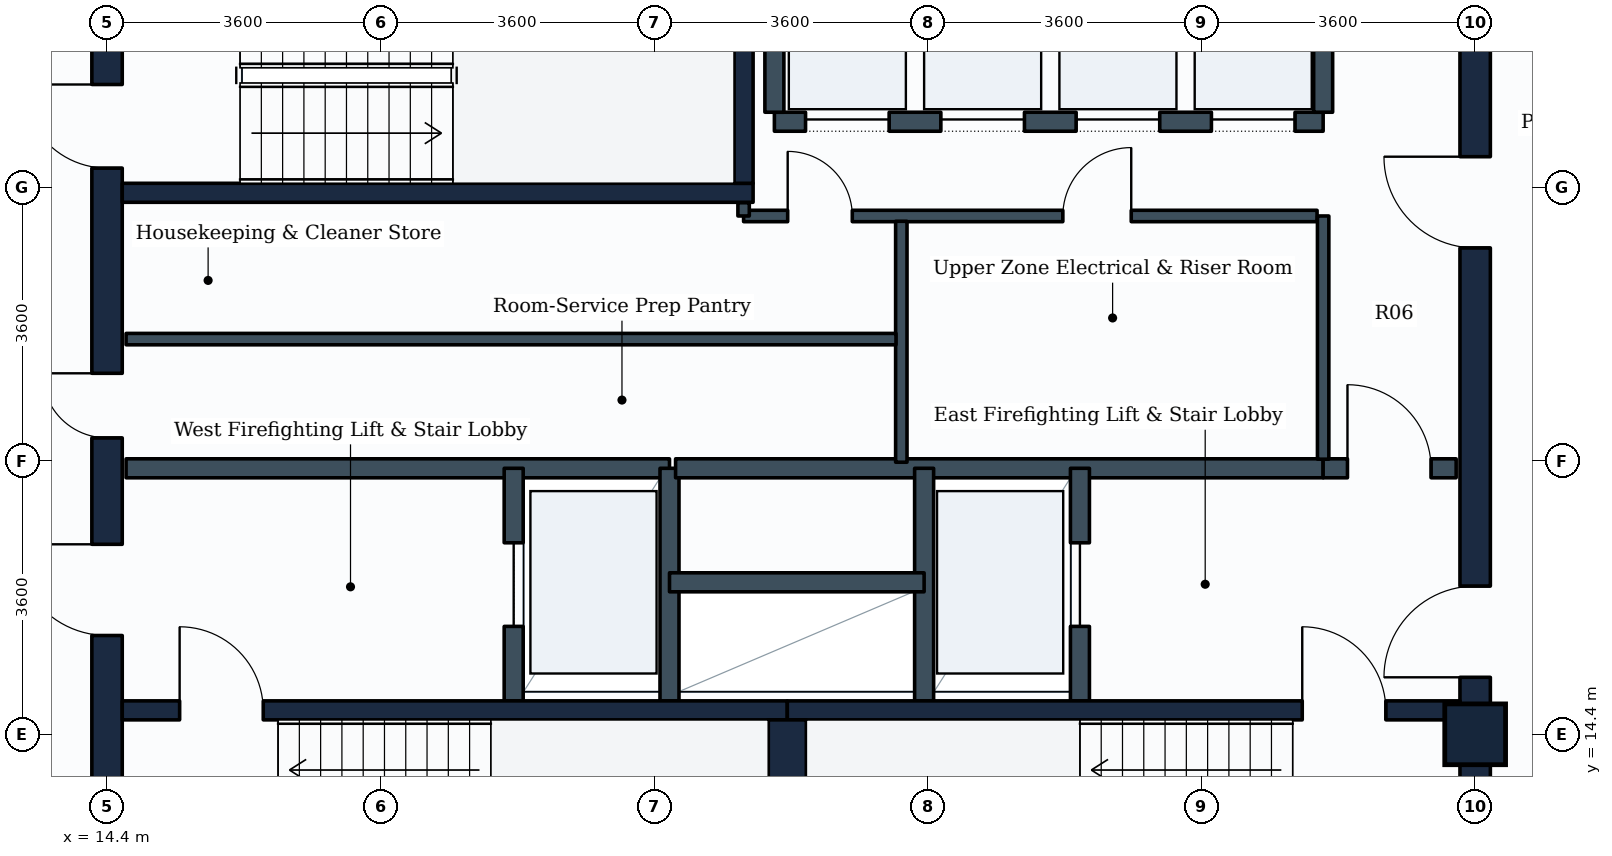
"""IFC4 building model, lengths in metres.
Left out: names, types, materials, properties, quantities, classifications, styles, units other than length and angle.
Written with IfcOpenShell. Run it as: python <this file> out.ifc"""

import sys

from ifc_helpers import new_model, si_unit, direction, frame, frame_2d, origin, origin_2d, place, context, subcontext, project, spatial, rectangle, extrude, element, fill, save


model = new_model("IFC4")
c1 = context("Model", 3, precision=1e-05, world=origin(), true_north=direction((0.0, 1.0)))
c2 = subcontext(c1, "Body", "Model", "MODEL_VIEW")
j1 = project(units=[si_unit("LENGTHUNIT", "METRE"), si_unit("PLANEANGLEUNIT", "RADIAN")], contexts=[c1])
p1 = place(None, origin())
s1 = spatial("IfcSite", under=j1, at=p1, CompositionType="ELEMENT")
p2 = place(p1, origin())
s2 = spatial("IfcBuilding", under=s1, at=p2, CompositionType="ELEMENT")
p3 = place(p2, frame((0.0, 0.0, 291.8)))
s3 = spatial("IfcBuildingStorey", under=s2, at=p3, CompositionType="ELEMENT", Elevation=291.8)
p4 = place(p3, frame((32.4, 14.4, 0.0), z_axis=(0.0, 0.0, 1.0), x_axis=(1.0, 0.0, 0.0)))
e1 = element("IfcColumn", 1, at=p4, inside=s3, PredefinedType="COLUMN", context=c2, shape_type="SweptSolid", body=[
    extrude(rectangle(XDim=0.8, YDim=0.8, at=origin_2d()), origin(), (0.0, 0.0, 1.0), 3.6),
])
p5 = place(p3, frame((14.4, 10.8, 0.0), z_axis=(0.0, 0.0, 1.0), x_axis=(0.0, 1.0, 0.0)))
e2 = element("IfcWall", 2, at=p5, inside=s3, PredefinedType="SHEAR", context=c2, shape_type="SweptSolid", body=[
    extrude(rectangle(XDim=14.4, YDim=0.4, at=frame_2d((7.2, 0.0))), origin(), (0.0, 0.0, 1.0), 3.35),
])
p6 = place(p5, frame((11.05, 0.0, 0.0)))
e3 = element("IfcOpeningElement", 3, at=p6, cuts=e2, PredefinedType="OPENING", context=c2, shape_type="SweptSolid", body=[
    extrude(rectangle(XDim=1.1, YDim=2.1, at=frame_2d((0.55, 1.05))), frame((0.0, 0.21, 0.0), z_axis=(0.0, -1.0, 0.0), x_axis=(1.0, 0.0, 0.0)), (0.0, 0.0, 1.0), 0.42),
])
p7 = place(p5, frame((4.9, 0.0, 0.0)))
e4 = element("IfcOpeningElement", 4, at=p7, cuts=e2, PredefinedType="OPENING", context=c2, shape_type="SweptSolid", body=[
    extrude(rectangle(XDim=1.2, YDim=2.1, at=frame_2d((0.6, 1.05))), frame((0.0, 0.21, 0.0), z_axis=(0.0, -1.0, 0.0), x_axis=(1.0, 0.0, 0.0)), (0.0, 0.0, 1.0), 0.42),
])
p8 = place(p5, frame((7.5, 0.0, 0.0)))
e5 = element("IfcOpeningElement", 5, at=p8, cuts=e2, PredefinedType="OPENING", context=c2, shape_type="SweptSolid", body=[
    extrude(rectangle(XDim=0.85, YDim=2.1, at=frame_2d((0.425, 1.05))), frame((0.0, 0.21, 0.0), z_axis=(0.0, -1.0, 0.0), x_axis=(1.0, 0.0, 0.0)), (0.0, 0.0, 1.0), 0.42),
])
p9 = place(p3, frame((32.4, 10.8, 0.0), z_axis=(0.0, 0.0, 1.0), x_axis=(0.0, 1.0, 0.0)))
e6 = element("IfcWall", 6, at=p9, inside=s3, PredefinedType="SHEAR", context=c2, shape_type="SweptSolid", body=[
    extrude(rectangle(XDim=14.4, YDim=0.4, at=frame_2d((7.2, 0.0))), origin(), (0.0, 0.0, 1.0), 3.35),
])
p10 = place(p9, frame((4.35, 0.0, 0.0)))
e7 = element("IfcOpeningElement", 7, at=p10, cuts=e6, PredefinedType="OPENING", context=c2, shape_type="SweptSolid", body=[
    extrude(rectangle(XDim=1.2, YDim=2.1, at=frame_2d((0.6, 1.05))), frame((0.0, 0.21, 0.0), z_axis=(0.0, -1.0, 0.0), x_axis=(1.0, 0.0, 0.0)), (0.0, 0.0, 1.0), 0.42),
])
p11 = place(p9, frame((10.0, 0.0, 0.0)))
e8 = element("IfcOpeningElement", 8, at=p11, cuts=e6, PredefinedType="OPENING", context=c2, shape_type="SweptSolid", body=[
    extrude(rectangle(XDim=1.2, YDim=2.1, at=frame_2d((0.6, 1.05))), frame((0.0, 0.21, 0.0), z_axis=(0.0, -1.0, 0.0), x_axis=(1.0, 0.0, 0.0)), (0.0, 0.0, 1.0), 0.42),
])
p12 = place(p3, frame((14.6, 14.715, 0.0), z_axis=(0.0, 0.0, 1.0), x_axis=(1.0, 0.0, 0.0)))
e9 = element("IfcWall", 9, at=p12, inside=s3, PredefinedType="SHEAR", context=c2, shape_type="SweptSolid", body=[
    extrude(rectangle(XDim=8.75, YDim=0.25, at=frame_2d((4.375, 0.0))), origin(), (0.0, 0.0, 1.0), 3.35),
])
p13 = place(p12, frame((0.755, 0.0, 0.0)))
e10 = element("IfcOpeningElement", 10, at=p13, cuts=e9, PredefinedType="OPENING", context=c2, shape_type="SweptSolid", body=[
    extrude(rectangle(XDim=1.1, YDim=2.1, at=frame_2d((0.55, 1.05))), frame((0.0, 0.135, 0.0), z_axis=(0.0, -1.0, 0.0), x_axis=(1.0, 0.0, 0.0)), (0.0, 0.0, 1.0), 0.27),
])
p14 = place(p3, frame((23.35, 14.715, 0.0), z_axis=(0.0, 0.0, 1.0), x_axis=(1.0, 0.0, 0.0)))
e11 = element("IfcWall", 11, at=p14, inside=s3, PredefinedType="SHEAR", context=c2, shape_type="SweptSolid", body=[
    extrude(rectangle(XDim=8.85, YDim=0.25, at=frame_2d((4.425, 0.0))), origin(), (0.0, 0.0, 1.0), 3.35),
])
p15 = place(p14, frame((6.775, 0.0, 0.0)))
e12 = element("IfcOpeningElement", 12, at=p15, cuts=e11, PredefinedType="OPENING", context=c2, shape_type="SweptSolid", body=[
    extrude(rectangle(XDim=1.1, YDim=2.1, at=frame_2d((0.55, 1.05))), frame((0.0, 0.135, 0.0), z_axis=(0.0, -1.0, 0.0), x_axis=(1.0, 0.0, 0.0)), (0.0, 0.0, 1.0), 0.27),
])
p16 = place(p3, frame((23.35, 11.75, 0.0), z_axis=(0.0, 0.0, 1.0), x_axis=(0.0, 1.0, 0.0)))
e13 = element("IfcWall", 13, at=p16, inside=s3, PredefinedType="SHEAR", context=c2, shape_type="SweptSolid", body=[
    extrude(rectangle(XDim=2.84, YDim=0.5, at=frame_2d((1.42, 0.0))), origin(), (0.0, 0.0, 1.0), 3.35),
])
p17 = place(p3, frame((14.6, 21.525, 0.0), z_axis=(0.0, 0.0, 1.0), x_axis=(1.0, 0.0, 0.0)))
e14 = element("IfcWall", 14, at=p17, inside=s3, PredefinedType="SHEAR", context=c2, shape_type="SweptSolid", body=[
    extrude(rectangle(XDim=8.3, YDim=0.25, at=frame_2d((4.15, 0.0))), origin(), (0.0, 0.0, 1.0), 3.35),
])
p18 = place(p3, frame((22.775, 21.65, 0.0), z_axis=(0.0, 0.0, 1.0), x_axis=(0.0, 1.0, 0.0)))
e15 = element("IfcWall", 15, at=p18, inside=s3, PredefinedType="SHEAR", context=c2, shape_type="SweptSolid", body=[
    extrude(rectangle(XDim=2.84, YDim=0.25, at=frame_2d((1.42, 0.0))), origin(), (0.0, 0.0, 1.0), 3.35),
])
p19 = place(p3, frame((14.65, 17.9, 0.0), z_axis=(0.0, 0.0, 1.0), x_axis=(1.0, 0.0, 0.0)))
e16 = element("IfcWall", 16, at=p19, inside=s3, PredefinedType="PARTITIONING", context=c2, shape_type="SweptSolid", body=[
    extrude(rectangle(XDim=7.15, YDim=0.25, at=frame_2d((3.575, 0.0))), origin(), (0.0, 0.0, 1.0), 3.335),
])
p20 = place(p3, frame((19.75, 14.84, 0.0), z_axis=(0.0, 0.0, 1.0), x_axis=(0.0, 1.0, 0.0)))
e17 = element("IfcWall", 17, at=p20, inside=s3, PredefinedType="PARTITIONING", context=c2, shape_type="SweptSolid", body=[
    extrude(rectangle(XDim=3.06, YDim=0.25, at=frame_2d((1.53, 0.0))), origin(), (0.0, 0.0, 1.0), 3.335),
])
p21 = place(p20, frame((0.98, 0.0, 0.0)))
e18 = element("IfcOpeningElement", 18, at=p21, cuts=e17, PredefinedType="OPENING", context=c2, shape_type="SweptSolid", body=[
    extrude(rectangle(XDim=1.1, YDim=2.1, at=frame_2d((0.55, 1.05))), frame((0.0, 0.135, 0.0), z_axis=(0.0, -1.0, 0.0), x_axis=(1.0, 0.0, 0.0)), (0.0, 0.0, 1.0), 0.27),
])
p22 = place(p3, frame((21.8, 14.84, 0.0), z_axis=(0.0, 0.0, 1.0), x_axis=(0.0, 1.0, 0.0)))
e19 = element("IfcWall", 19, at=p22, inside=s3, PredefinedType="PARTITIONING", context=c2, shape_type="SweptSolid", body=[
    extrude(rectangle(XDim=3.06, YDim=0.25, at=frame_2d((1.53, 0.0))), origin(), (0.0, 0.0, 1.0), 3.335),
])
p23 = place(p3, frame((21.88, 17.9, 0.0), z_axis=(0.0, 0.0, 1.0), x_axis=(1.0, 0.0, 0.0)))
e20 = element("IfcWall", 20, at=p23, inside=s3, PredefinedType="PARTITIONING", context=c2, shape_type="SweptSolid", body=[
    extrude(rectangle(XDim=8.52, YDim=0.25, at=frame_2d((4.26, 0.0))), origin(), (0.0, 0.0, 1.0), 3.335),
])
p24 = place(p3, frame((30.4, 17.9, 0.0), z_axis=(0.0, 0.0, 1.0), x_axis=(1.0, 0.0, 0.0)))
e21 = element("IfcWall", 21, at=p24, inside=s3, PredefinedType="PARTITIONING", context=c2, shape_type="SweptSolid", body=[
    extrude(rectangle(XDim=1.75, YDim=0.25, at=frame_2d((0.875, 0.0))), origin(), (0.0, 0.0, 1.0), 3.335),
])
p25 = place(p24, frame((0.32, 0.0, 0.0)))
e22 = element("IfcOpeningElement", 22, at=p25, cuts=e21, PredefinedType="OPENING", context=c2, shape_type="SweptSolid", body=[
    extrude(rectangle(XDim=1.1, YDim=2.1, at=frame_2d((0.55, 1.05))), frame((0.0, 0.135, 0.0), z_axis=(0.0, -1.0, 0.0), x_axis=(1.0, 0.0, 0.0)), (0.0, 0.0, 1.0), 0.27),
])
p26 = place(p3, frame((25.15, 14.84, 0.0), z_axis=(0.0, 0.0, 1.0), x_axis=(0.0, 1.0, 0.0)))
e23 = element("IfcWall", 23, at=p26, inside=s3, PredefinedType="PARTITIONING", context=c2, shape_type="SweptSolid", body=[
    extrude(rectangle(XDim=3.06, YDim=0.25, at=frame_2d((1.53, 0.0))), origin(), (0.0, 0.0, 1.0), 3.335),
])
p27 = place(p3, frame((27.2, 14.84, 0.0), z_axis=(0.0, 0.0, 1.0), x_axis=(0.0, 1.0, 0.0)))
e24 = element("IfcWall", 24, at=p27, inside=s3, PredefinedType="PARTITIONING", context=c2, shape_type="SweptSolid", body=[
    extrude(rectangle(XDim=3.06, YDim=0.25, at=frame_2d((1.53, 0.0))), origin(), (0.0, 0.0, 1.0), 3.335),
])
p28 = place(p27, frame((0.98, 0.0, 0.0)))
e25 = element("IfcOpeningElement", 25, at=p28, cuts=e24, PredefinedType="OPENING", context=c2, shape_type="SweptSolid", body=[
    extrude(rectangle(XDim=1.1, YDim=2.1, at=frame_2d((0.55, 1.05))), frame((0.0, 0.135, 0.0), z_axis=(0.0, -1.0, 0.0), x_axis=(1.0, 0.0, 0.0)), (0.0, 0.0, 1.0), 0.27),
])
p29 = place(p3, frame((21.8, 16.4, 0.0), z_axis=(0.0, 0.0, 1.0), x_axis=(1.0, 0.0, 0.0)))
e26 = element("IfcWall", 26, at=p29, inside=s3, PredefinedType="PARTITIONING", context=c2, shape_type="SweptSolid", body=[
    extrude(rectangle(XDim=3.35, YDim=0.25, at=frame_2d((1.675, 0.0))), origin(), (0.0, 0.0, 1.0), 3.335),
])
p30 = place(p3, frame((23.18, 22.46, 0.0), z_axis=(0.0, 0.0, 1.0), x_axis=(1.0, 0.0, 0.0)))
e27 = element("IfcWall", 27, at=p30, inside=s3, PredefinedType="PARTITIONING", context=c2, shape_type="SweptSolid", body=[
    extrude(rectangle(XDim=7.22, YDim=0.25, at=frame_2d((3.61, 0.0))), origin(), (0.0, 0.0, 1.0), 3.335),
])
p31 = place(p30, frame((0.41, 0.0, 0.0)))
e28 = element("IfcOpeningElement", 28, at=p31, cuts=e27, PredefinedType="OPENING", context=c2, shape_type="SweptSolid", body=[
    extrude(rectangle(XDim=1.1, YDim=2.1, at=frame_2d((0.55, 1.05))), frame((0.0, 0.135, 0.0), z_axis=(0.0, -1.0, 0.0), x_axis=(1.0, 0.0, 0.0)), (0.0, 0.0, 1.0), 0.27),
])
p32 = place(p30, frame((2.19, 0.0, 0.0)))
e29 = element("IfcOpeningElement", 29, at=p32, cuts=e27, PredefinedType="OPENING", context=c2, shape_type="SweptSolid", body=[
    extrude(rectangle(XDim=1.1, YDim=2.1, at=frame_2d((0.55, 1.05))), frame((0.0, 0.135, 0.0), z_axis=(0.0, -1.0, 0.0), x_axis=(1.0, 0.0, 0.0)), (0.0, 0.0, 1.0), 0.27),
])
p33 = place(p30, frame((3.97, 0.0, 0.0)))
e30 = element("IfcOpeningElement", 30, at=p33, cuts=e27, PredefinedType="OPENING", context=c2, shape_type="SweptSolid", body=[
    extrude(rectangle(XDim=1.1, YDim=2.1, at=frame_2d((0.55, 1.05))), frame((0.0, 0.135, 0.0), z_axis=(0.0, -1.0, 0.0), x_axis=(1.0, 0.0, 0.0)), (0.0, 0.0, 1.0), 0.27),
])
p34 = place(p30, frame((5.75, 0.0, 0.0)))
e31 = element("IfcOpeningElement", 31, at=p34, cuts=e27, PredefinedType="OPENING", context=c2, shape_type="SweptSolid", body=[
    extrude(rectangle(XDim=1.1, YDim=2.1, at=frame_2d((0.55, 1.05))), frame((0.0, 0.135, 0.0), z_axis=(0.0, -1.0, 0.0), x_axis=(1.0, 0.0, 0.0)), (0.0, 0.0, 1.0), 0.27),
])
for number, where, z_axis, x_axis in (
    (32, (23.18, 22.585, 0.0), (0.0, 0.0, 1.0), (0.0, 1.0, 0.0)),
    (33, (30.4, 22.585, 0.0), (0.0, 0.0, 1.0), (0.0, 1.0, 0.0)),
):
    element("IfcWall", number, at=place(p3, frame(where, z_axis=z_axis, x_axis=x_axis)), inside=s3, PredefinedType="PARTITIONING", context=c2, shape_type="SweptSolid", body=[
        extrude(rectangle(XDim=2.315, YDim=0.25, at=frame_2d((1.157, 0.0))), origin(), (0.0, 0.0, 1.0), 3.335),
    ])
p35 = place(p3, frame((22.775, 21.22, 0.0), z_axis=(0.0, 0.0, 1.0), x_axis=(1.0, 0.0, 0.0)))
e34 = element("IfcWall", 34, at=p35, inside=s3, PredefinedType="PARTITIONING", context=c2, shape_type="SweptSolid", body=[
    extrude(rectangle(XDim=7.545, YDim=0.15, at=frame_2d((3.772, 0.0))), origin(), (0.0, 0.0, 1.0), 3.335),
])
p36 = place(p35, frame((0.58, 0.0, 0.0)))
e35 = element("IfcOpeningElement", 35, at=p36, cuts=e34, PredefinedType="OPENING", context=c2, shape_type="SweptSolid", body=[
    extrude(rectangle(XDim=0.85, YDim=2.1, at=frame_2d((0.425, 1.05))), frame((0.0, 0.085, 0.0), z_axis=(0.0, -1.0, 0.0), x_axis=(1.0, 0.0, 0.0)), (0.0, 0.0, 1.0), 0.17),
])
p37 = place(p35, frame((4.2, 0.0, 0.0)))
e36 = element("IfcOpeningElement", 36, at=p37, cuts=e34, PredefinedType="OPENING", context=c2, shape_type="SweptSolid", body=[
    extrude(rectangle(XDim=0.9, YDim=2.1, at=frame_2d((0.45, 1.05))), frame((0.0, 0.085, 0.0), z_axis=(0.0, -1.0, 0.0), x_axis=(1.0, 0.0, 0.0)), (0.0, 0.0, 1.0), 0.17),
])
p38 = place(p3, frame((22.775, 21.22, 0.0), z_axis=(0.0, 0.0, 1.0), x_axis=(0.0, 1.0, 0.0)))
e37 = element("IfcWall", 37, at=p38, inside=s3, PredefinedType="PARTITIONING", context=c2, shape_type="SweptSolid", body=[
    extrude(rectangle(XDim=0.175, YDim=0.15, at=frame_2d((0.087, 0.0))), origin(), (0.0, 0.0, 1.0), 3.335),
])
p39 = place(p3, frame((30.4, 18.02, 0.0), z_axis=(0.0, 0.0, 1.0), x_axis=(0.0, 1.0, 0.0)))
e38 = element("IfcWall", 38, at=p39, inside=s3, PredefinedType="PARTITIONING", context=c2, shape_type="SweptSolid", body=[
    extrude(rectangle(XDim=3.2, YDim=0.15, at=frame_2d((1.6, 0.0))), origin(), (0.0, 0.0, 1.0), 3.335),
])
p40 = place(p3, frame((24.85, 17.98, 0.0), z_axis=(0.0, 0.0, 1.0), x_axis=(0.0, 1.0, 0.0)))
e39 = element("IfcWall", 39, at=p40, inside=s3, PredefinedType="PARTITIONING", context=c2, shape_type="SweptSolid", body=[
    extrude(rectangle(XDim=3.17, YDim=0.15, at=frame_2d((1.585, 0.0))), origin(), (0.0, 0.0, 1.0), 3.335),
])
p41 = place(p3, frame((14.65, 19.6, 0.0), z_axis=(0.0, 0.0, 1.0), x_axis=(1.0, 0.0, 0.0)))
e40 = element("IfcWall", 40, at=p41, inside=s3, PredefinedType="PARTITIONING", context=c2, shape_type="SweptSolid", body=[
    extrude(rectangle(XDim=10.13, YDim=0.15, at=frame_2d((5.065, 0.0))), origin(), (0.0, 0.0, 1.0), 3.335),
])
p42 = place(p13, origin())
e41 = element("IfcDoor", 41, at=p42, inside=s3, OperationType="SINGLE_SWING_LEFT", PredefinedType="DOOR", context=c2, shape_type="SweptSolid", body=[
    extrude(rectangle(XDim=1.1, YDim=2.1, at=frame_2d((0.55, 1.05))), frame((0.0, 0.025, 0.0), z_axis=(0.0, -1.0, 0.0), x_axis=(1.0, 0.0, 0.0)), (0.0, 0.0, 1.0), 0.05),
])
fill(e10, e41)
p43 = place(p15, origin())
e42 = element("IfcDoor", 42, at=p43, inside=s3, OperationType="SINGLE_SWING_LEFT", PredefinedType="DOOR", context=c2, shape_type="SweptSolid", body=[
    extrude(rectangle(XDim=1.1, YDim=2.1, at=frame_2d((0.55, 1.05))), frame((0.0, 0.025, 0.0), z_axis=(0.0, -1.0, 0.0), x_axis=(1.0, 0.0, 0.0)), (0.0, 0.0, 1.0), 0.05),
])
fill(e12, e42)
p44 = place(p6, origin())
e43 = element("IfcDoor", 43, at=p44, inside=s3, OperationType="SINGLE_SWING_RIGHT", PredefinedType="DOOR", context=c2, shape_type="SweptSolid", body=[
    extrude(rectangle(XDim=1.1, YDim=2.1, at=frame_2d((0.55, 1.05))), frame((0.0, 0.025, 0.0), z_axis=(0.0, -1.0, 0.0), x_axis=(1.0, 0.0, 0.0)), (0.0, 0.0, 1.0), 0.05),
])
fill(e3, e43)
p45 = place(p21, origin())
e44 = element("IfcDoor", 44, at=p45, inside=s3, OperationType="SLIDING_TO_LEFT", PredefinedType="DOOR", context=c2, shape_type="SweptSolid", body=[
    extrude(rectangle(XDim=1.1, YDim=2.1, at=frame_2d((0.55, 1.05))), frame((0.0, 0.025, 0.0), z_axis=(0.0, -1.0, 0.0), x_axis=(1.0, 0.0, 0.0)), (0.0, 0.0, 1.0), 0.05),
])
fill(e18, e44)
p46 = place(p28, origin())
e45 = element("IfcDoor", 45, at=p46, inside=s3, OperationType="SLIDING_TO_LEFT", PredefinedType="DOOR", context=c2, shape_type="SweptSolid", body=[
    extrude(rectangle(XDim=1.1, YDim=2.1, at=frame_2d((0.55, 1.05))), frame((0.0, 0.025, 0.0), z_axis=(0.0, -1.0, 0.0), x_axis=(1.0, 0.0, 0.0)), (0.0, 0.0, 1.0), 0.05),
])
fill(e25, e45)
p47 = place(p7, origin())
e46 = element("IfcDoor", 46, at=p47, inside=s3, OperationType="SINGLE_SWING_RIGHT", PredefinedType="DOOR", context=c2, shape_type="SweptSolid", body=[
    extrude(rectangle(XDim=1.2, YDim=2.1, at=frame_2d((0.6, 1.05))), frame((0.0, 0.025, 0.0), z_axis=(0.0, -1.0, 0.0), x_axis=(1.0, 0.0, 0.0)), (0.0, 0.0, 1.0), 0.05),
])
fill(e4, e46)
p48 = place(p10, origin())
e47 = element("IfcDoor", 47, at=p48, inside=s3, OperationType="SINGLE_SWING_LEFT", PredefinedType="DOOR", context=c2, shape_type="SweptSolid", body=[
    extrude(rectangle(XDim=1.2, YDim=2.1, at=frame_2d((0.6, 1.05))), frame((0.0, 0.025, 0.0), z_axis=(0.0, -1.0, 0.0), x_axis=(1.0, 0.0, 0.0)), (0.0, 0.0, 1.0), 0.05),
])
fill(e7, e47)
p49 = place(p25, origin())
e48 = element("IfcDoor", 48, at=p49, inside=s3, OperationType="SINGLE_SWING_LEFT", PredefinedType="DOOR", context=c2, shape_type="SweptSolid", body=[
    extrude(rectangle(XDim=1.1, YDim=2.1, at=frame_2d((0.55, 1.05))), frame((0.0, 0.025, 0.0), z_axis=(0.0, -1.0, 0.0), x_axis=(1.0, 0.0, 0.0)), (0.0, 0.0, 1.0), 0.05),
])
fill(e22, e48)
p50 = place(p31, origin())
e49 = element("IfcDoor", 49, at=p50, inside=s3, OperationType="SLIDING_TO_LEFT", PredefinedType="DOOR", context=c2, shape_type="SweptSolid", body=[
    extrude(rectangle(XDim=1.1, YDim=2.1, at=frame_2d((0.55, 1.05))), frame((0.0, 0.025, 0.0), z_axis=(0.0, -1.0, 0.0), x_axis=(1.0, 0.0, 0.0)), (0.0, 0.0, 1.0), 0.05),
])
fill(e28, e49)
p51 = place(p32, origin())
e50 = element("IfcDoor", 50, at=p51, inside=s3, OperationType="SLIDING_TO_LEFT", PredefinedType="DOOR", context=c2, shape_type="SweptSolid", body=[
    extrude(rectangle(XDim=1.1, YDim=2.1, at=frame_2d((0.55, 1.05))), frame((0.0, 0.025, 0.0), z_axis=(0.0, -1.0, 0.0), x_axis=(1.0, 0.0, 0.0)), (0.0, 0.0, 1.0), 0.05),
])
fill(e29, e50)
p52 = place(p33, origin())
e51 = element("IfcDoor", 51, at=p52, inside=s3, OperationType="SLIDING_TO_LEFT", PredefinedType="DOOR", context=c2, shape_type="SweptSolid", body=[
    extrude(rectangle(XDim=1.1, YDim=2.1, at=frame_2d((0.55, 1.05))), frame((0.0, 0.025, 0.0), z_axis=(0.0, -1.0, 0.0), x_axis=(1.0, 0.0, 0.0)), (0.0, 0.0, 1.0), 0.05),
])
fill(e30, e51)
p53 = place(p34, origin())
e52 = element("IfcDoor", 52, at=p53, inside=s3, OperationType="SLIDING_TO_LEFT", PredefinedType="DOOR", context=c2, shape_type="SweptSolid", body=[
    extrude(rectangle(XDim=1.1, YDim=2.1, at=frame_2d((0.55, 1.05))), frame((0.0, 0.025, 0.0), z_axis=(0.0, -1.0, 0.0), x_axis=(1.0, 0.0, 0.0)), (0.0, 0.0, 1.0), 0.05),
])
fill(e31, e52)
p54 = place(p11, origin())
e53 = element("IfcDoor", 53, at=p54, inside=s3, OperationType="SINGLE_SWING_RIGHT", PredefinedType="DOOR", context=c2, shape_type="SweptSolid", body=[
    extrude(rectangle(XDim=1.2, YDim=2.1, at=frame_2d((0.6, 1.05))), frame((0.0, 0.025, 0.0), z_axis=(0.0, -1.0, 0.0), x_axis=(1.0, 0.0, 0.0)), (0.0, 0.0, 1.0), 0.05),
])
fill(e8, e53)
p55 = place(p8, origin())
e54 = element("IfcDoor", 54, at=p55, inside=s3, OperationType="SINGLE_SWING_RIGHT", PredefinedType="DOOR", context=c2, shape_type="SweptSolid", body=[
    extrude(rectangle(XDim=0.85, YDim=2.1, at=frame_2d((0.425, 1.05))), frame((0.0, 0.025, 0.0), z_axis=(0.0, -1.0, 0.0), x_axis=(1.0, 0.0, 0.0)), (0.0, 0.0, 1.0), 0.05),
])
fill(e5, e54)
p56 = place(p36, origin())
e55 = element("IfcDoor", 55, at=p56, inside=s3, OperationType="SINGLE_SWING_LEFT", PredefinedType="DOOR", context=c2, shape_type="SweptSolid", body=[
    extrude(rectangle(XDim=0.85, YDim=2.1, at=frame_2d((0.425, 1.05))), frame((0.0, 0.025, 0.0), z_axis=(0.0, -1.0, 0.0), x_axis=(1.0, 0.0, 0.0)), (0.0, 0.0, 1.0), 0.05),
])
fill(e35, e55)
p57 = place(p37, origin())
e56 = element("IfcDoor", 56, at=p57, inside=s3, OperationType="SINGLE_SWING_RIGHT", PredefinedType="DOOR", context=c2, shape_type="SweptSolid", body=[
    extrude(rectangle(XDim=0.9, YDim=2.1, at=frame_2d((0.45, 1.05))), frame((0.0, 0.025, 0.0), z_axis=(0.0, -1.0, 0.0), x_axis=(1.0, 0.0, 0.0)), (0.0, 0.0, 1.0), 0.05),
])
fill(e36, e56)
save(model, sys.argv[1])
